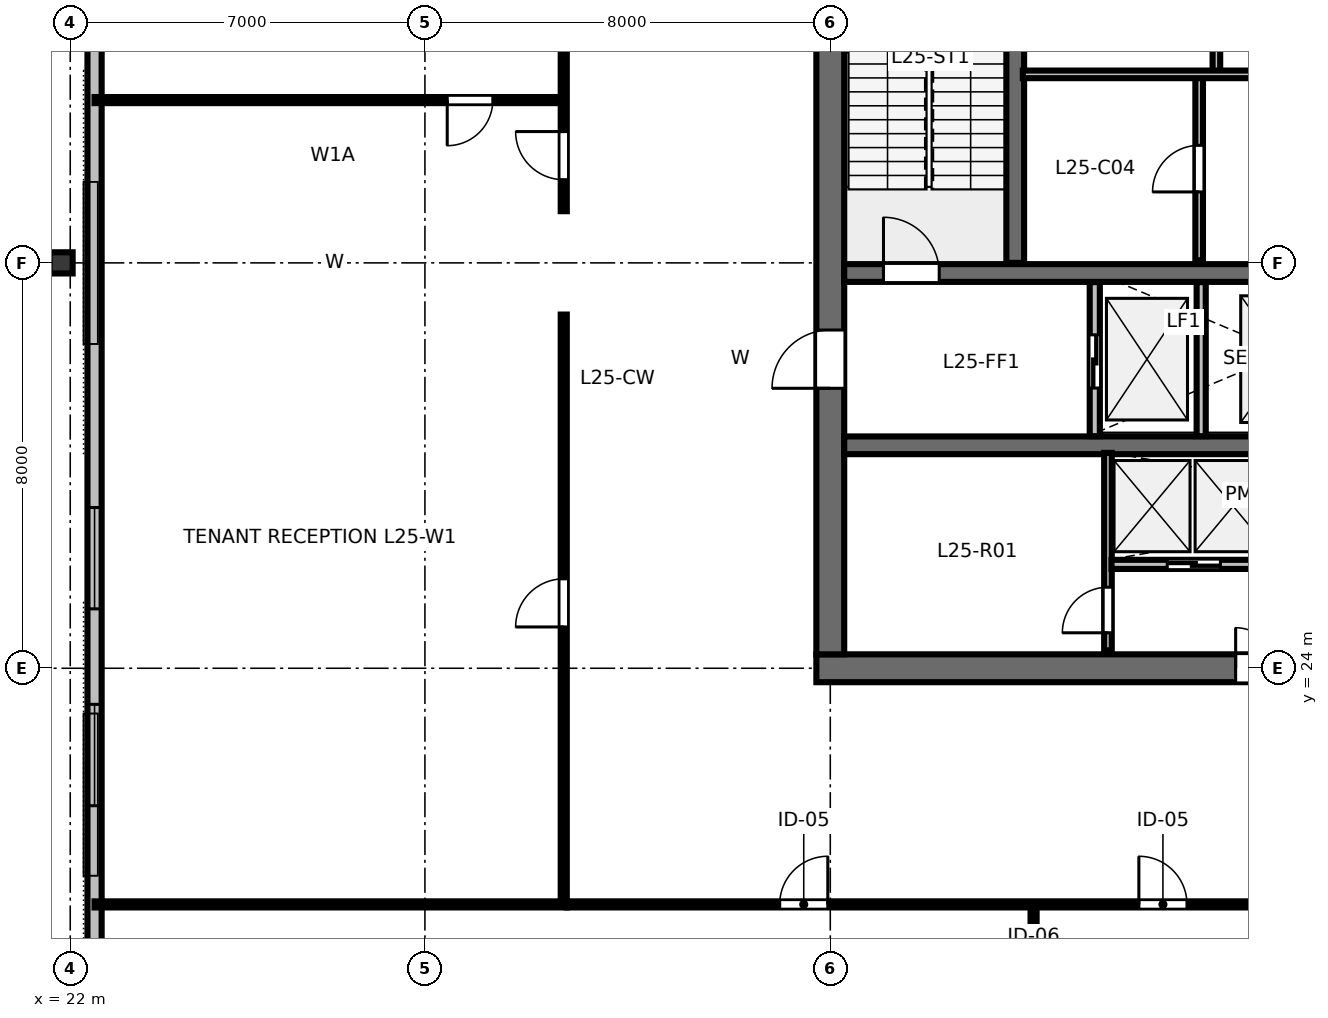
"""IFC4 building model, lengths in metres.
Left out: names, types, materials, properties, quantities, classifications, styles, units other than length and angle.
Written with IfcOpenShell. Run it as: python <this file> out.ifc"""

import sys

from ifc_helpers import new_model, si_unit, direction, frame, frame_2d, origin, origin_2d, place, context, subcontext, project, spatial, rectangle, i_section, extrude, element, fill, save


model = new_model("IFC4")
c1 = context("Model", 3, precision=1e-05, world=origin(), true_north=direction((0.0, 1.0)))
c2 = subcontext(c1, "Body", "Model", "MODEL_VIEW")
j1 = project(units=[si_unit("LENGTHUNIT", "METRE"), si_unit("PLANEANGLEUNIT", "RADIAN")], contexts=[c1])
p1 = place(None, origin())
s1 = spatial("IfcSite", under=j1, at=p1, CompositionType="ELEMENT")
p2 = place(p1, origin())
s2 = spatial("IfcBuilding", under=s1, at=p2, CompositionType="ELEMENT")
p3 = place(p2, frame((0.0, 0.0, 98.8)))
s3 = spatial("IfcBuildingStorey", under=s2, at=p3, CompositionType="ELEMENT", Elevation=98.8)
p4 = place(p3, frame((36.725, 24.0, 0.0), z_axis=(0.0, 0.0, 1.0), x_axis=(1.0, 0.0, 0.0)))
e1 = element("IfcWall", 1, at=p4, inside=s3, PredefinedType="SHEAR", context=c2, shape_type="SweptSolid", body=[
    extrude(rectangle(XDim=18.55, YDim=0.55, at=frame_2d((9.275, 0.0))), origin(), (0.0, 0.0, 1.0), 3.36),
])
p5 = place(p4, frame((8.275, 0.0, 0.0)))
e2 = element("IfcOpeningElement", 2, at=p5, cuts=e1, PredefinedType="OPENING", context=c2, shape_type="SweptSolid", body=[
    extrude(rectangle(XDim=1.6, YDim=2.15, at=frame_2d((0.8, 1.075))), frame((0.0, 0.285, 0.0), z_axis=(0.0, -1.0, 0.0), x_axis=(1.0, 0.0, 0.0)), (0.0, 0.0, 1.0), 0.57),
])
p6 = place(p4, frame((13.675, 0.0, 0.0)))
e3 = element("IfcOpeningElement", 3, at=p6, cuts=e1, PredefinedType="OPENING", context=c2, shape_type="SweptSolid", body=[
    extrude(rectangle(XDim=1.6, YDim=2.15, at=frame_2d((0.8, 1.075))), frame((0.0, 0.285, 0.0), z_axis=(0.0, -1.0, 0.0), x_axis=(1.0, 0.0, 0.0)), (0.0, 0.0, 1.0), 0.57),
])
p7 = place(p3, frame((37.0, 24.275, 0.0), z_axis=(0.0, 0.0, 1.0), x_axis=(0.0, 1.0, 0.0)))
e4 = element("IfcWall", 4, at=p7, inside=s3, PredefinedType="SHEAR", context=c2, shape_type="SweptSolid", body=[
    extrude(rectangle(XDim=15.45, YDim=0.55, at=frame_2d((7.725, 0.0))), origin(), (0.0, 0.0, 1.0), 3.36),
])
p8 = place(p7, frame((5.25, 0.0, 0.0)))
e5 = element("IfcOpeningElement", 5, at=p8, cuts=e4, PredefinedType="OPENING", context=c2, shape_type="SweptSolid", body=[
    extrude(rectangle(XDim=1.15, YDim=2.15, at=frame_2d((0.575, 1.075))), frame((0.0, 0.285, 0.0), z_axis=(0.0, -1.0, 0.0), x_axis=(1.0, 0.0, 0.0)), (0.0, 0.0, 1.0), 0.57),
])
p9 = place(p3, frame((37.275, 31.8, 0.0), z_axis=(0.0, 0.0, 1.0), x_axis=(1.0, 0.0, 0.0)))
e6 = element("IfcWall", 6, at=p9, inside=s3, PredefinedType="SHEAR", context=c2, shape_type="SweptSolid", body=[
    extrude(rectangle(XDim=17.45, YDim=0.35, at=frame_2d((8.725, 0.0))), origin(), (0.0, 0.0, 1.0), 3.36),
])
p10 = place(p9, frame((0.775, 0.0, 0.0)))
e7 = element("IfcOpeningElement", 7, at=p10, cuts=e6, PredefinedType="OPENING", context=c2, shape_type="SweptSolid", body=[
    extrude(rectangle(XDim=1.1, YDim=2.15, at=frame_2d((0.55, 1.075))), frame((0.0, 0.185, 0.0), z_axis=(0.0, -1.0, 0.0), x_axis=(1.0, 0.0, 0.0)), (0.0, 0.0, 1.0), 0.37),
])
p11 = place(p9, frame((14.675, 0.0, 0.0)))
e8 = element("IfcOpeningElement", 8, at=p11, cuts=e6, PredefinedType="OPENING", context=c2, shape_type="SweptSolid", body=[
    extrude(rectangle(XDim=1.1, YDim=2.15, at=frame_2d((0.55, 1.075))), frame((0.0, 0.185, 0.0), z_axis=(0.0, -1.0, 0.0), x_axis=(1.0, 0.0, 0.0)), (0.0, 0.0, 1.0), 0.37),
])
p12 = place(p3, frame((37.275, 28.4, 0.0), z_axis=(0.0, 0.0, 1.0), x_axis=(1.0, 0.0, 0.0)))
e9 = element("IfcWall", 9, at=p12, inside=s3, PredefinedType="SHEAR", context=c2, shape_type="SweptSolid", body=[
    extrude(rectangle(XDim=17.45, YDim=0.35, at=frame_2d((8.725, 0.0))), origin(), (0.0, 0.0, 1.0), 3.36),
])
p13 = place(p3, frame((21.82, 32.0, 0.0), z_axis=(0.0, 0.0, 1.0), x_axis=(0.0, 1.0, 0.0)))
e10 = element("IfcColumn", 10, at=p13, inside=s3, PredefinedType="COLUMN", context=c2, shape_type="SweptSolid", body=[
    extrude(i_section(OverallWidth=0.418, OverallDepth=0.455, WebThickness=0.042, FlangeThickness=0.068, FilletRadius=0.025, at=origin_2d()), origin(), (0.0, 0.0, 1.0), 3.358),
])
p14 = place(p3, frame((22.48, 48.64, 0.0), z_axis=(0.0, 0.0, 1.0), x_axis=(0.0, -1.0, 0.0)))
e11 = element("IfcWall", 11, at=p14, inside=s3, PredefinedType="STANDARD", context=c2, shape_type="SweptSolid", body=[
    extrude(rectangle(XDim=33.28, YDim=0.28, at=frame_2d((16.64, 0.0))), origin(), (0.0, 0.0, 1.0), 3.36),
])
p15 = place(p14, frame((5.927, 0.0, 0.8)))
e12 = element("IfcOpeningElement", 12, at=p15, cuts=e11, PredefinedType="OPENING", context=c2, shape_type="SweptSolid", body=[
    extrude(rectangle(XDim=2.0, YDim=1.95, at=frame_2d((1.0, 0.975))), frame((0.0, 0.15, 0.0), z_axis=(0.0, -1.0, 0.0), x_axis=(1.0, 0.0, 0.0)), (0.0, 0.0, 1.0), 0.3),
])
p16 = place(p14, frame((9.812, 0.0, 0.8)))
e13 = element("IfcOpeningElement", 13, at=p16, cuts=e11, PredefinedType="OPENING", context=c2, shape_type="SweptSolid", body=[
    extrude(rectangle(XDim=2.0, YDim=1.95, at=frame_2d((1.0, 0.975))), frame((0.0, 0.15, 0.0), z_axis=(0.0, -1.0, 0.0), x_axis=(1.0, 0.0, 0.0)), (0.0, 0.0, 1.0), 0.3),
])
p17 = place(p14, frame((21.468, 0.0, 0.8)))
e14 = element("IfcOpeningElement", 14, at=p17, cuts=e11, PredefinedType="OPENING", context=c2, shape_type="SweptSolid", body=[
    extrude(rectangle(XDim=2.0, YDim=1.95, at=frame_2d((1.0, 0.975))), frame((0.0, 0.15, 0.0), z_axis=(0.0, -1.0, 0.0), x_axis=(1.0, 0.0, 0.0)), (0.0, 0.0, 1.0), 0.3),
])
p18 = place(p14, frame((25.353, 0.0, 0.8)))
e15 = element("IfcOpeningElement", 15, at=p18, cuts=e11, PredefinedType="OPENING", context=c2, shape_type="SweptSolid", body=[
    extrude(rectangle(XDim=2.0, YDim=1.95, at=frame_2d((1.0, 0.975))), frame((0.0, 0.15, 0.0), z_axis=(0.0, -1.0, 0.0), x_axis=(1.0, 0.0, 0.0)), (0.0, 0.0, 1.0), 0.3),
])
p19 = place(p3, frame((40.65, 32.0, 0.0), z_axis=(0.0, 0.0, 1.0), x_axis=(0.0, 1.0, 0.0)))
e16 = element("IfcWall", 16, at=p19, inside=s3, PredefinedType="SHEAR", context=c2, shape_type="SweptSolid", body=[
    extrude(rectangle(XDim=7.7, YDim=0.35, at=frame_2d((3.85, 0.0))), origin(), (0.0, 0.0, 1.0), 3.6),
])
p20 = place(p3, frame((44.62, 35.72, 0.0), z_axis=(0.0, 0.0, 1.0), x_axis=(0.0, 1.0, 0.0)))
e17 = element("IfcWall", 17, at=p20, inside=s3, PredefinedType="PARTITIONING", context=c2, shape_type="SweptSolid", body=[
    extrude(rectangle(XDim=3.93, YDim=0.15, at=frame_2d((1.965, 0.0))), origin(), (0.0, 0.0, 1.0), 3.36),
])
p21 = place(p20, frame((1.5, 0.0, 0.0)))
e18 = element("IfcOpeningElement", 18, at=p21, cuts=e17, PredefinedType="OPENING", context=c2, shape_type="SweptSolid", body=[
    extrude(rectangle(XDim=0.9, YDim=2.15, at=frame_2d((0.45, 1.075))), frame((0.0, 0.085, 0.0), z_axis=(0.0, -1.0, 0.0), x_axis=(1.0, 0.0, 0.0)), (0.0, 0.0, 1.0), 0.17),
])
p22 = place(p3, frame((44.28, 32.05, 0.0), z_axis=(0.0, 0.0, 1.0), x_axis=(0.0, 1.0, 0.0)))
e19 = element("IfcWall", 19, at=p22, inside=s3, PredefinedType="PARTITIONING", context=c2, shape_type="SweptSolid", body=[
    extrude(rectangle(XDim=3.67, YDim=0.15, at=frame_2d((1.835, 0.0))), origin(), (0.0, 0.0, 1.0), 3.36),
])
p23 = place(p22, frame((1.35, 0.0, 0.0)))
e20 = element("IfcOpeningElement", 20, at=p23, cuts=e19, PredefinedType="OPENING", context=c2, shape_type="SweptSolid", body=[
    extrude(rectangle(XDim=0.92, YDim=2.15, at=frame_2d((0.46, 1.075))), frame((0.0, 0.085, 0.0), z_axis=(0.0, -1.0, 0.0), x_axis=(1.0, 0.0, 0.0)), (0.0, 0.0, 1.0), 0.17),
])
p24 = place(p3, frame((40.8, 35.72, 0.0), z_axis=(0.0, 0.0, 1.0), x_axis=(1.0, 0.0, 0.0)))
e21 = element("IfcWall", 21, at=p24, inside=s3, PredefinedType="PARTITIONING", context=c2, shape_type="SweptSolid", body=[
    extrude(rectangle(XDim=10.4, YDim=0.15, at=frame_2d((5.2, 0.0))), origin(), (0.0, 0.0, 1.0), 3.36),
])
p25 = place(p24, frame((4.9, 0.0, 0.0)))
e22 = element("IfcOpeningElement", 22, at=p25, cuts=e21, PredefinedType="OPENING", context=c2, shape_type="SweptSolid", body=[
    extrude(rectangle(XDim=0.9, YDim=2.15, at=frame_2d((0.45, 1.075))), frame((0.0, 0.085, 0.0), z_axis=(0.0, -1.0, 0.0), x_axis=(1.0, 0.0, 0.0)), (0.0, 0.0, 1.0), 0.17),
])
p26 = place(p3, frame((42.22, 28.58, 0.0), z_axis=(0.0, 0.0, 1.0), x_axis=(0.0, 1.0, 0.0)))
e23 = element("IfcWall", 23, at=p26, inside=s3, PredefinedType="PARTITIONING", context=c2, shape_type="SweptSolid", body=[
    extrude(rectangle(XDim=3.04, YDim=0.2, at=frame_2d((1.52, 0.0))), origin(), (0.0, 0.0, 1.0), 3.36),
])
p27 = place(p26, frame((0.95, 0.0, 0.0)))
e24 = element("IfcOpeningElement", 24, at=p27, cuts=e23, PredefinedType="OPENING", context=c2, shape_type="SweptSolid", body=[
    extrude(rectangle(XDim=1.05, YDim=2.15, at=frame_2d((0.525, 1.075))), frame((0.0, 0.11, 0.0), z_axis=(0.0, -1.0, 0.0), x_axis=(1.0, 0.0, 0.0)), (0.0, 0.0, 1.0), 0.22),
])
p28 = place(p3, frame((44.32, 28.58, 0.0), z_axis=(0.0, 0.0, 1.0), x_axis=(0.0, 1.0, 0.0)))
e25 = element("IfcWall", 25, at=p28, inside=s3, PredefinedType="PARTITIONING", context=c2, shape_type="SweptSolid", body=[
    extrude(rectangle(XDim=3.04, YDim=0.18, at=frame_2d((1.52, 0.0))), origin(), (0.0, 0.0, 1.0), 3.36),
])
p29 = place(p3, frame((42.48, 24.35, 0.0), z_axis=(0.0, 0.0, 1.0), x_axis=(0.0, 1.0, 0.0)))
e26 = element("IfcWall", 26, at=p29, inside=s3, PredefinedType="PARTITIONING", context=c2, shape_type="SweptSolid", body=[
    extrude(rectangle(XDim=3.9, YDim=0.15, at=frame_2d((1.95, 0.0))), origin(), (0.0, 0.0, 1.0), 3.36),
])
p30 = place(p29, frame((0.35, 0.0, 0.0)))
e27 = element("IfcOpeningElement", 27, at=p30, cuts=e26, PredefinedType="OPENING", context=c2, shape_type="SweptSolid", body=[
    extrude(rectangle(XDim=0.9, YDim=2.15, at=frame_2d((0.45, 1.075))), frame((0.0, 0.085, 0.0), z_axis=(0.0, -1.0, 0.0), x_axis=(1.0, 0.0, 0.0)), (0.0, 0.0, 1.0), 0.17),
])
p31 = place(p3, frame((42.55, 26.05, 0.0), z_axis=(0.0, 0.0, 1.0), x_axis=(1.0, 0.0, 0.0)))
e28 = element("IfcWall", 28, at=p31, inside=s3, PredefinedType="PARTITIONING", context=c2, shape_type="SweptSolid", body=[
    extrude(rectangle(XDim=12.05, YDim=0.18, at=frame_2d((6.025, 0.0))), origin(), (0.0, 0.0, 1.0), 3.36),
])
p32 = place(p31, frame((1.1, 0.0, 0.0)))
e29 = element("IfcOpeningElement", 29, at=p32, cuts=e28, PredefinedType="OPENING", context=c2, shape_type="SweptSolid", body=[
    extrude(rectangle(XDim=1.05, YDim=2.15, at=frame_2d((0.525, 1.075))), frame((0.0, 0.1, 0.0), z_axis=(0.0, -1.0, 0.0), x_axis=(1.0, 0.0, 0.0)), (0.0, 0.0, 1.0), 0.2),
])
p33 = place(p31, frame((3.0, 0.0, 0.0)))
e30 = element("IfcOpeningElement", 30, at=p33, cuts=e28, PredefinedType="OPENING", context=c2, shape_type="SweptSolid", body=[
    extrude(rectangle(XDim=1.05, YDim=2.15, at=frame_2d((0.525, 1.075))), frame((0.0, 0.1, 0.0), z_axis=(0.0, -1.0, 0.0), x_axis=(1.0, 0.0, 0.0)), (0.0, 0.0, 1.0), 0.2),
])
p34 = place(p3, frame((41.012, 19.34, 0.0), z_axis=(0.0, 0.0, 1.0), x_axis=(0.0, -1.0, 0.0)))
e31 = element("IfcWall", 31, at=p34, inside=s3, PredefinedType="PARTITIONING", context=c2, shape_type="SweptSolid", body=[
    extrude(rectangle(XDim=8.06, YDim=0.12, at=frame_2d((4.03, 0.0))), origin(), (0.0, 0.0, 1.0), 2.64),
])
p35 = place(p34, frame((1.4, 0.0, 0.0)))
e32 = element("IfcOpeningElement", 32, at=p35, cuts=e31, PredefinedType="OPENING", context=c2, shape_type="SweptSolid", body=[
    extrude(rectangle(XDim=0.9, YDim=2.15, at=frame_2d((0.45, 1.075))), frame((0.0, 0.07, 0.0), z_axis=(0.0, -1.0, 0.0), x_axis=(1.0, 0.0, 0.0)), (0.0, 0.0, 1.0), 0.14),
])
p36 = place(p3, frame((31.8, 19.34, 0.0), z_axis=(0.0, 0.0, 1.0), x_axis=(1.0, 0.0, 0.0)))
e33 = element("IfcWall", 33, at=p36, inside=s3, PredefinedType="PARTITIONING", context=c2, shape_type="SweptSolid", body=[
    extrude(rectangle(XDim=28.4, YDim=0.12, at=frame_2d((14.2, 0.0))), origin(), (0.0, 0.0, 1.0), 2.64),
])
p37 = place(p36, frame((4.201, 0.0, 0.0)))
e34 = element("IfcOpeningElement", 34, at=p37, cuts=e33, PredefinedType="OPENING", context=c2, shape_type="SweptSolid", body=[
    extrude(rectangle(XDim=0.95, YDim=2.15, at=frame_2d((0.475, 1.075))), frame((0.0, 0.07, 0.0), z_axis=(0.0, -1.0, 0.0), x_axis=(1.0, 0.0, 0.0)), (0.0, 0.0, 1.0), 0.14),
])
p38 = place(p36, frame((11.29, 0.0, 0.0)))
e35 = element("IfcOpeningElement", 35, at=p38, cuts=e33, PredefinedType="OPENING", context=c2, shape_type="SweptSolid", body=[
    extrude(rectangle(XDim=0.95, YDim=2.15, at=frame_2d((0.475, 1.075))), frame((0.0, 0.07, 0.0), z_axis=(0.0, -1.0, 0.0), x_axis=(1.0, 0.0, 0.0)), (0.0, 0.0, 1.0), 0.14),
])
p39 = place(p36, frame((17.423, 0.0, 0.0)))
e36 = element("IfcOpeningElement", 36, at=p39, cuts=e33, PredefinedType="OPENING", context=c2, shape_type="SweptSolid", body=[
    extrude(rectangle(XDim=0.95, YDim=2.15, at=frame_2d((0.475, 1.075))), frame((0.0, 0.07, 0.0), z_axis=(0.0, -1.0, 0.0), x_axis=(1.0, 0.0, 0.0)), (0.0, 0.0, 1.0), 0.14),
])
p40 = place(p36, frame((24.394, 0.0, 0.0)))
e37 = element("IfcOpeningElement", 37, at=p40, cuts=e33, PredefinedType="OPENING", context=c2, shape_type="SweptSolid", body=[
    extrude(rectangle(XDim=0.95, YDim=2.15, at=frame_2d((0.475, 1.075))), frame((0.0, 0.07, 0.0), z_axis=(0.0, -1.0, 0.0), x_axis=(1.0, 0.0, 0.0)), (0.0, 0.0, 1.0), 0.14),
])
p41 = place(p3, frame((31.74, 35.213, 0.0), z_axis=(0.0, 0.0, 1.0), x_axis=(-1.0, 0.0, 0.0)))
e38 = element("IfcWall", 38, at=p41, inside=s3, PredefinedType="PARTITIONING", context=c2, shape_type="SweptSolid", body=[
    extrude(rectangle(XDim=9.26, YDim=0.12, at=frame_2d((4.63, 0.0))), origin(), (0.0, 0.0, 1.0), 2.64),
])
p42 = place(p41, frame((1.4, 0.0, 0.0)))
e39 = element("IfcOpeningElement", 39, at=p42, cuts=e38, PredefinedType="OPENING", context=c2, shape_type="SweptSolid", body=[
    extrude(rectangle(XDim=0.9, YDim=2.15, at=frame_2d((0.45, 1.075))), frame((0.0, 0.07, 0.0), z_axis=(0.0, -1.0, 0.0), x_axis=(1.0, 0.0, 0.0)), (0.0, 0.0, 1.0), 0.14),
])
p43 = place(p3, frame((31.74, 19.4, 0.0), z_axis=(0.0, 0.0, 1.0), x_axis=(0.0, 1.0, 0.0)))
e40 = element("IfcWall", 40, at=p43, inside=s3, PredefinedType="PARTITIONING", context=c2, shape_type="SweptSolid", body=[
    extrude(rectangle(XDim=11.58, YDim=0.12, at=frame_2d((5.79, 0.0))), origin(), (0.0, 0.0, 1.0), 2.64),
])
p44 = place(p43, frame((5.415, 0.0, 0.0)))
e41 = element("IfcOpeningElement", 41, at=p44, cuts=e40, PredefinedType="OPENING", context=c2, shape_type="SweptSolid", body=[
    extrude(rectangle(XDim=0.95, YDim=2.15, at=frame_2d((0.475, 1.075))), frame((0.0, 0.07, 0.0), z_axis=(0.0, -1.0, 0.0), x_axis=(1.0, 0.0, 0.0)), (0.0, 0.0, 1.0), 0.14),
])
p45 = place(p3, frame((31.74, 33.02, 0.0), z_axis=(0.0, 0.0, 1.0), x_axis=(0.0, 1.0, 0.0)))
e42 = element("IfcWall", 42, at=p45, inside=s3, PredefinedType="PARTITIONING", context=c2, shape_type="SweptSolid", body=[
    extrude(rectangle(XDim=11.58, YDim=0.12, at=frame_2d((5.79, 0.0))), origin(), (0.0, 0.0, 1.0), 2.64),
])
p46 = place(p45, frame((0.621, 0.0, 0.0)))
e43 = element("IfcOpeningElement", 43, at=p46, cuts=e42, PredefinedType="OPENING", context=c2, shape_type="SweptSolid", body=[
    extrude(rectangle(XDim=0.95, YDim=2.15, at=frame_2d((0.475, 1.075))), frame((0.0, 0.07, 0.0), z_axis=(0.0, -1.0, 0.0), x_axis=(1.0, 0.0, 0.0)), (0.0, 0.0, 1.0), 0.14),
])
p47 = place(p45, frame((6.311, 0.0, 0.0)))
e44 = element("IfcOpeningElement", 44, at=p47, cuts=e42, PredefinedType="OPENING", context=c2, shape_type="SweptSolid", body=[
    extrude(rectangle(XDim=0.95, YDim=2.15, at=frame_2d((0.475, 1.075))), frame((0.0, 0.07, 0.0), z_axis=(0.0, -1.0, 0.0), x_axis=(1.0, 0.0, 0.0)), (0.0, 0.0, 1.0), 0.14),
])
p48 = place(p3, frame((31.8, 19.34, 0.0), z_axis=(0.0, 0.0, 1.0), x_axis=(-1.0, 0.0, 0.0)))
e45 = element("IfcWall", 45, at=p48, inside=s3, PredefinedType="PARTITIONING", context=c2, shape_type="SweptSolid", body=[
    extrude(rectangle(XDim=9.32, YDim=0.12, at=frame_2d((4.66, 0.0))), origin(), (0.0, 0.0, 1.0), 2.64),
])
p49 = place(p17, origin())
e46 = element("IfcWindow", 46, at=p49, inside=s3, PartitioningType="SINGLE_PANEL", PredefinedType="WINDOW", context=c2, shape_type="SweptSolid", body=[
    extrude(rectangle(XDim=2.0, YDim=1.95, at=frame_2d((1.0, 0.975))), frame((0.0, 0.03, 0.0), z_axis=(0.0, -1.0, 0.0), x_axis=(1.0, 0.0, 0.0)), (0.0, 0.0, 1.0), 0.06),
])
fill(e14, e46)
p50 = place(p18, origin())
e47 = element("IfcWindow", 47, at=p50, inside=s3, PartitioningType="SINGLE_PANEL", PredefinedType="WINDOW", context=c2, shape_type="SweptSolid", body=[
    extrude(rectangle(XDim=2.0, YDim=1.95, at=frame_2d((1.0, 0.975))), frame((0.0, 0.03, 0.0), z_axis=(0.0, -1.0, 0.0), x_axis=(1.0, 0.0, 0.0)), (0.0, 0.0, 1.0), 0.06),
])
fill(e15, e47)
p51 = place(p10, origin())
e48 = element("IfcDoor", 48, at=p51, inside=s3, OperationType="SINGLE_SWING_LEFT", PredefinedType="DOOR", context=c2, shape_type="SweptSolid", body=[
    extrude(rectangle(XDim=1.1, YDim=2.15, at=frame_2d((0.55, 1.075))), frame((0.0, 0.025, 0.0), z_axis=(0.0, -1.0, 0.0), x_axis=(1.0, 0.0, 0.0)), (0.0, 0.0, 1.0), 0.05),
])
fill(e7, e48)
p52 = place(p8, origin())
e49 = element("IfcDoor", 49, at=p52, inside=s3, OperationType="SINGLE_SWING_LEFT", PredefinedType="DOOR", context=c2, shape_type="SweptSolid", body=[
    extrude(rectangle(XDim=1.15, YDim=2.15, at=frame_2d((0.575, 1.075))), frame((0.0, 0.025, 0.0), z_axis=(0.0, -1.0, 0.0), x_axis=(1.0, 0.0, 0.0)), (0.0, 0.0, 1.0), 0.05),
])
fill(e5, e49)
p53 = place(p5, origin())
e50 = element("IfcDoor", 50, at=p53, inside=s3, OperationType="DOUBLE_DOOR_SINGLE_SWING", PredefinedType="DOOR", context=c2, shape_type="SweptSolid", body=[
    extrude(rectangle(XDim=1.6, YDim=2.15, at=frame_2d((0.8, 1.075))), frame((0.0, 0.025, 0.0), z_axis=(0.0, -1.0, 0.0), x_axis=(1.0, 0.0, 0.0)), (0.0, 0.0, 1.0), 0.05),
])
fill(e2, e50)
p54 = place(p23, origin())
e51 = element("IfcDoor", 51, at=p54, inside=s3, OperationType="SINGLE_SWING_LEFT", PredefinedType="DOOR", context=c2, shape_type="SweptSolid", body=[
    extrude(rectangle(XDim=0.92, YDim=2.15, at=frame_2d((0.46, 1.075))), frame((0.0, 0.025, 0.0), z_axis=(0.0, -1.0, 0.0), x_axis=(1.0, 0.0, 0.0)), (0.0, 0.0, 1.0), 0.05),
])
fill(e20, e51)
p55 = place(p27, origin())
e52 = element("IfcDoor", 52, at=p55, inside=s3, OperationType="SLIDING_TO_LEFT", PredefinedType="DOOR", context=c2, shape_type="SweptSolid", body=[
    extrude(rectangle(XDim=1.05, YDim=2.15, at=frame_2d((0.525, 1.075))), frame((0.0, 0.025, 0.0), z_axis=(0.0, -1.0, 0.0), x_axis=(1.0, 0.0, 0.0)), (0.0, 0.0, 1.0), 0.05),
])
fill(e24, e52)
p56 = place(p30, origin())
e53 = element("IfcDoor", 53, at=p56, inside=s3, OperationType="SINGLE_SWING_LEFT", PredefinedType="DOOR", context=c2, shape_type="SweptSolid", body=[
    extrude(rectangle(XDim=0.9, YDim=2.15, at=frame_2d((0.45, 1.075))), frame((0.0, 0.025, 0.0), z_axis=(0.0, -1.0, 0.0), x_axis=(1.0, 0.0, 0.0)), (0.0, 0.0, 1.0), 0.05),
])
fill(e27, e53)
p57 = place(p32, origin())
e54 = element("IfcDoor", 54, at=p57, inside=s3, OperationType="SLIDING_TO_LEFT", PredefinedType="DOOR", context=c2, shape_type="SweptSolid", body=[
    extrude(rectangle(XDim=1.05, YDim=2.15, at=frame_2d((0.525, 1.075))), frame((0.0, 0.025, 0.0), z_axis=(0.0, -1.0, 0.0), x_axis=(1.0, 0.0, 0.0)), (0.0, 0.0, 1.0), 0.05),
])
fill(e29, e54)
p58 = place(p37, origin())
e55 = element("IfcDoor", 55, at=p58, inside=s3, OperationType="SINGLE_SWING_RIGHT", PredefinedType="DOOR", context=c2, shape_type="SweptSolid", body=[
    extrude(rectangle(XDim=0.95, YDim=2.15, at=frame_2d((0.475, 1.075))), frame((0.0, 0.025, 0.0), z_axis=(0.0, -1.0, 0.0), x_axis=(1.0, 0.0, 0.0)), (0.0, 0.0, 1.0), 0.05),
])
fill(e34, e55)
p59 = place(p38, origin())
e56 = element("IfcDoor", 56, at=p59, inside=s3, OperationType="SINGLE_SWING_LEFT", PredefinedType="DOOR", context=c2, shape_type="SweptSolid", body=[
    extrude(rectangle(XDim=0.95, YDim=2.15, at=frame_2d((0.475, 1.075))), frame((0.0, 0.025, 0.0), z_axis=(0.0, -1.0, 0.0), x_axis=(1.0, 0.0, 0.0)), (0.0, 0.0, 1.0), 0.05),
])
fill(e35, e56)
p60 = place(p42, origin())
e57 = element("IfcDoor", 57, at=p60, inside=s3, OperationType="SINGLE_SWING_RIGHT", PredefinedType="DOOR", context=c2, shape_type="SweptSolid", body=[
    extrude(rectangle(XDim=0.9, YDim=2.15, at=frame_2d((0.45, 1.075))), frame((0.0, 0.025, 0.0), z_axis=(0.0, -1.0, 0.0), x_axis=(1.0, 0.0, 0.0)), (0.0, 0.0, 1.0), 0.05),
])
fill(e39, e57)
p61 = place(p44, origin())
e58 = element("IfcDoor", 58, at=p61, inside=s3, OperationType="SINGLE_SWING_LEFT", PredefinedType="DOOR", context=c2, shape_type="SweptSolid", body=[
    extrude(rectangle(XDim=0.95, YDim=2.15, at=frame_2d((0.475, 1.075))), frame((0.0, 0.025, 0.0), z_axis=(0.0, -1.0, 0.0), x_axis=(1.0, 0.0, 0.0)), (0.0, 0.0, 1.0), 0.05),
])
fill(e41, e58)
p62 = place(p46, origin())
e59 = element("IfcDoor", 59, at=p62, inside=s3, OperationType="SINGLE_SWING_RIGHT", PredefinedType="DOOR", context=c2, shape_type="SweptSolid", body=[
    extrude(rectangle(XDim=0.95, YDim=2.15, at=frame_2d((0.475, 1.075))), frame((0.0, 0.025, 0.0), z_axis=(0.0, -1.0, 0.0), x_axis=(1.0, 0.0, 0.0)), (0.0, 0.0, 1.0), 0.05),
])
fill(e43, e59)
save(model, sys.argv[1])
